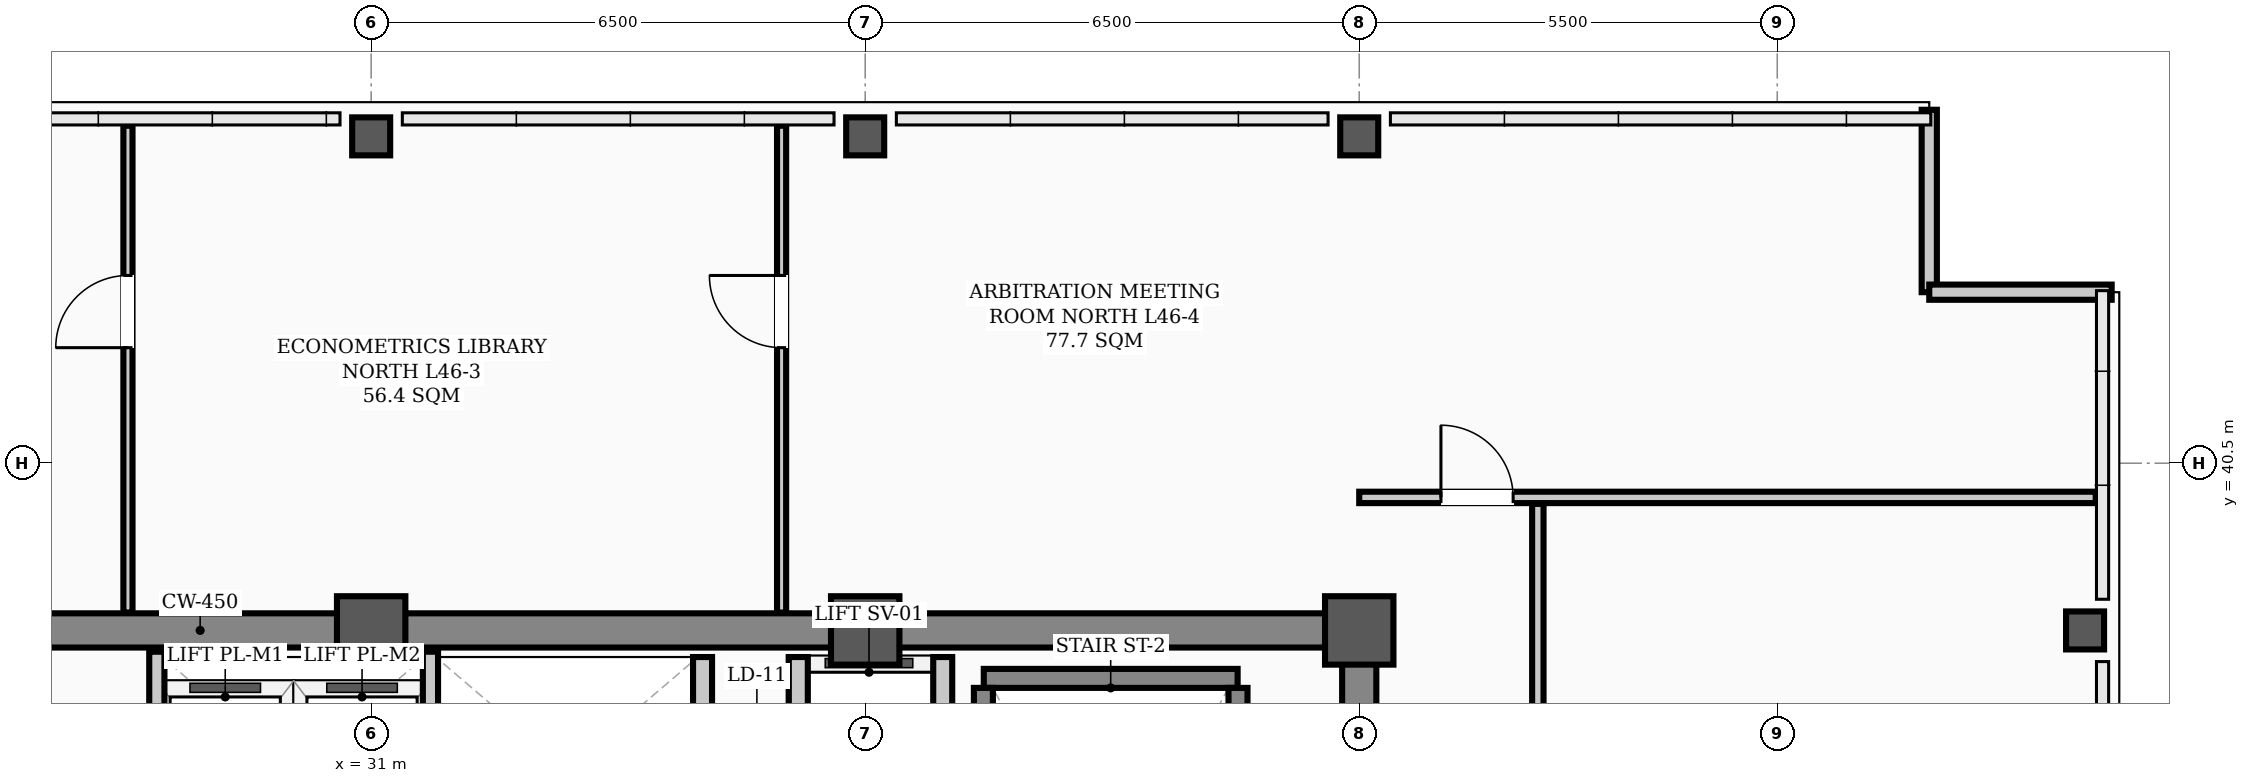
"""IFC4 building model, lengths in metres.
Left out: names, types, materials, properties, quantities, classifications, styles, units other than length and angle.
Written with IfcOpenShell. Run it as: python <this file> out.ifc"""

import sys

from ifc_helpers import new_model, si_unit, direction, frame, frame_2d, origin, origin_2d, place, context, subcontext, project, spatial, rectangle, hollow_rectangle, extrude, element, fill, save


model = new_model("IFC4")
c1 = context("Model", 3, precision=1e-05, world=origin(), true_north=direction((0.0, 1.0)))
c2 = subcontext(c1, "Body", "Model", "MODEL_VIEW")
j1 = project(units=[si_unit("LENGTHUNIT", "METRE"), si_unit("PLANEANGLEUNIT", "RADIAN")], contexts=[c1])
p1 = place(None, origin())
s1 = spatial("IfcSite", under=j1, at=p1, CompositionType="ELEMENT")
p2 = place(p1, origin())
s2 = spatial("IfcBuilding", under=s1, at=p2, CompositionType="ELEMENT")
p3 = place(p2, frame((0.0, 0.0, 185.1)))
s3 = spatial("IfcBuildingStorey", under=s2, at=p3, CompositionType="ELEMENT", Elevation=185.1)
for number, where, z_axis, x_axis in (
    (1, (31.0, 38.3, 0.0), (0.0, 0.0, 1.0), (1.0, 0.0, 0.0)),
    (2, (37.5, 38.3, 0.0), (0.0, 0.0, 1.0), (1.0, 0.0, 0.0)),
    (3, (44.0, 38.3, 0.0), (0.0, 0.0, 1.0), (1.0, 0.0, 0.0)),
):
    element("IfcColumn", number, at=place(p3, frame(where, z_axis=z_axis, x_axis=x_axis)), inside=s3, PredefinedType="COLUMN", context=c2, shape_type="SweptSolid", body=[
        extrude(hollow_rectangle(XDim=0.9, YDim=0.9, WallThickness=0.035, InnerFilletRadius=0.017, OuterFilletRadius=0.052, at=origin_2d()), origin(), (0.0, 0.0, 1.0), 3.9),
    ])
for number, where, z_axis, x_axis in (
    (4, (31.0, 44.8, 0.0), (0.0, 0.0, 1.0), (1.0, 0.0, 0.0)),
    (5, (37.5, 44.8, 0.0), (0.0, 0.0, 1.0), (1.0, 0.0, 0.0)),
    (6, (44.0, 44.8, 0.0), (0.0, 0.0, 1.0), (1.0, 0.0, 0.0)),
    (7, (53.55, 38.3, 0.0), (0.0, 0.0, 1.0), (1.0, 0.0, 0.0)),
):
    element("IfcColumn", number, at=place(p3, frame(where, z_axis=z_axis, x_axis=x_axis)), inside=s3, PredefinedType="COLUMN", context=c2, shape_type="SweptSolid", body=[
        extrude(hollow_rectangle(XDim=0.5, YDim=0.5, WallThickness=0.024, InnerFilletRadius=0.012, OuterFilletRadius=0.036, at=origin_2d()), origin(), (0.0, 0.0, 1.0), 3.9),
    ])
for number, where, z_axis, x_axis in (
    (8, (51.5, 45.15, 0.0), (0.0, 0.0, 1.0), (0.0, -1.0, 0.0)),
    (9, (51.5, 42.75, 0.0), (0.0, 0.0, 1.0), (1.0, 0.0, 0.0)),
):
    element("IfcWall", number, at=place(p3, frame(where, z_axis=z_axis, x_axis=x_axis)), inside=s3, PredefinedType="PARAPET", context=c2, shape_type="SweptSolid", body=[
        extrude(rectangle(XDim=2.4, YDim=0.2, at=frame_2d((1.2, 0.0))), origin(), (0.0, 0.0, 1.0), 1.2),
    ])
p4 = place(p3, frame((13.5, 38.3, 0.0), z_axis=(0.0, 0.0, 1.0), x_axis=(1.0, 0.0, 0.0)))
e10 = element("IfcWall", 10, at=p4, inside=s3, PredefinedType="SHEAR", context=c2, shape_type="SweptSolid", body=[
    extrude(rectangle(XDim=30.5, YDim=0.45, at=frame_2d((15.25, 0.0))), origin(), (0.0, 0.0, 1.0), 3.72),
])
p5 = place(p3, frame((44.0, 29.35, 0.0), z_axis=(0.0, 0.0, 1.0), x_axis=(0.0, 1.0, 0.0)))
e11 = element("IfcWall", 11, at=p5, inside=s3, PredefinedType="SHEAR", context=c2, shape_type="SweptSolid", body=[
    extrude(rectangle(XDim=8.6, YDim=0.45, at=frame_2d((4.3, 0.0))), origin(), (0.0, 0.0, 1.0), 3.72),
])
p6 = place(p3, frame((39.06, 37.669, 0.0), z_axis=(0.0, 0.0, 1.0), x_axis=(1.0, 0.0, 0.0)))
e12 = element("IfcWall", 12, at=p6, inside=s3, PredefinedType="STANDARD", context=c2, shape_type="SweptSolid", body=[
    extrude(rectangle(XDim=3.34, YDim=0.25, at=frame_2d((1.67, 0.0))), origin(), (0.0, 0.0, 1.0), 3.72),
])
for number, where, z_axis, x_axis in (
    (13, (39.055, 30.36, 0.0), (0.0, 0.0, 1.0), (0.0, 1.0, 0.0)),
    (14, (42.405, 30.36, 0.0), (0.0, 0.0, 1.0), (0.0, 1.0, 0.0)),
):
    element("IfcWall", number, at=place(p3, frame(where, z_axis=z_axis, x_axis=x_axis)), inside=s3, PredefinedType="STANDARD", context=c2, shape_type="SweptSolid", body=[
        extrude(rectangle(XDim=7.184, YDim=0.25, at=frame_2d((3.592, 0.0))), origin(), (0.0, 0.0, 1.0), 3.72),
    ])
p7 = place(p3, frame((36.62, 31.95, 0.0), z_axis=(0.0, 0.0, 1.0), x_axis=(0.0, 1.0, 0.0)))
e15 = element("IfcWall", 15, at=p7, inside=s3, PredefinedType="STANDARD", context=c2, shape_type="SweptSolid", body=[
    extrude(rectangle(XDim=6.0, YDim=0.25, at=frame_2d((3.0, 0.0))), origin(), (0.0, 0.0, 1.0), 3.35),
])
p8 = place(p7, frame((0.9, 0.0, 0.0)))
e16 = element("IfcOpeningElement", 16, at=p8, cuts=e15, PredefinedType="OPENING", context=c2, shape_type="SweptSolid", body=[
    extrude(rectangle(XDim=1.1, YDim=2.08, at=frame_2d((0.55, 1.04))), frame((0.0, 0.135, 0.0), z_axis=(0.0, -1.0, 0.0), x_axis=(1.0, 0.0, 0.0)), (0.0, 0.0, 1.0), 0.27),
])
p9 = place(p7, frame((4.0, 0.0, 0.0)))
e17 = element("IfcOpeningElement", 17, at=p9, cuts=e15, PredefinedType="OPENING", context=c2, shape_type="SweptSolid", body=[
    extrude(rectangle(XDim=1.1, YDim=2.08, at=frame_2d((0.55, 1.04))), frame((0.0, 0.135, 0.0), z_axis=(0.0, -1.0, 0.0), x_axis=(1.0, 0.0, 0.0)), (0.0, 0.0, 1.0), 0.27),
])
p10 = place(p3, frame((38.52, 31.95, 0.0), z_axis=(0.0, 0.0, 1.0), x_axis=(0.0, 1.0, 0.0)))
e18 = element("IfcWall", 18, at=p10, inside=s3, PredefinedType="STANDARD", context=c2, shape_type="SweptSolid", body=[
    extrude(rectangle(XDim=6.0, YDim=0.25, at=frame_2d((3.0, 0.0))), origin(), (0.0, 0.0, 1.0), 3.35),
])
p11 = place(p3, frame((35.36, 34.9, 0.0), z_axis=(0.0, 0.0, 1.0), x_axis=(0.0, 1.0, 0.0)))
e19 = element("IfcWall", 19, at=p11, inside=s3, PredefinedType="STANDARD", context=c2, shape_type="SweptSolid", body=[
    extrude(rectangle(XDim=3.05, YDim=0.25, at=frame_2d((1.525, 0.0))), origin(), (0.0, 0.0, 1.0), 3.35),
])
p12 = place(p3, frame((44.0, 40.05, 0.0), z_axis=(0.0, 0.0, 1.0), x_axis=(1.0, 0.0, 0.0)))
e20 = element("IfcWall", 20, at=p12, inside=s3, PredefinedType="PARTITIONING", context=c2, shape_type="SweptSolid", body=[
    extrude(rectangle(XDim=9.69, YDim=0.15, at=frame_2d((4.845, 0.0))), origin(), (0.0, 0.0, 1.0), 3.2),
])
p13 = place(p12, frame((1.075, 0.0, 0.0)))
e21 = element("IfcOpeningElement", 21, at=p13, cuts=e20, PredefinedType="OPENING", context=c2, shape_type="SweptSolid", body=[
    extrude(rectangle(XDim=0.95, YDim=2.08, at=frame_2d((0.475, 1.04))), frame((0.0, 0.085, 0.0), z_axis=(0.0, -1.0, 0.0), x_axis=(1.0, 0.0, 0.0)), (0.0, 0.0, 1.0), 0.17),
])
p14 = place(p3, frame((46.35, 26.385, 0.0), z_axis=(0.0, 0.0, 1.0), x_axis=(0.0, 1.0, 0.0)))
e22 = element("IfcWall", 22, at=p14, inside=s3, PredefinedType="PARTITIONING", context=c2, shape_type="SweptSolid", body=[
    extrude(rectangle(XDim=13.58, YDim=0.15, at=frame_2d((6.79, 0.0))), origin(), (0.0, 0.0, 1.0), 3.1),
])
p15 = place(p14, frame((0.64, 0.0, 0.0)))
e23 = element("IfcOpeningElement", 23, at=p15, cuts=e22, PredefinedType="OPENING", context=c2, shape_type="SweptSolid", body=[
    extrude(rectangle(XDim=0.95, YDim=2.08, at=frame_2d((0.475, 1.04))), frame((0.0, 0.085, 0.0), z_axis=(0.0, -1.0, 0.0), x_axis=(1.0, 0.0, 0.0)), (0.0, 0.0, 1.0), 0.17),
])
p16 = place(p14, frame((9.665, 0.0, 0.0)))
e24 = element("IfcOpeningElement", 24, at=p16, cuts=e22, PredefinedType="OPENING", context=c2, shape_type="SweptSolid", body=[
    extrude(rectangle(XDim=0.95, YDim=2.08, at=frame_2d((0.475, 1.04))), frame((0.0, 0.085, 0.0), z_axis=(0.0, -1.0, 0.0), x_axis=(1.0, 0.0, 0.0)), (0.0, 0.0, 1.0), 0.17),
])
p17 = place(p3, frame((27.8, 38.535, 0.0), z_axis=(0.0, 0.0, 1.0), x_axis=(0.0, 1.0, 0.0)))
e25 = element("IfcWall", 25, at=p17, inside=s3, PredefinedType="PARTITIONING", context=c2, shape_type="SweptSolid", body=[
    extrude(rectangle(XDim=6.405, YDim=0.12, at=frame_2d((3.203, 0.0))), origin(), (0.0, 0.0, 1.0), 3.212),
])
p18 = place(p17, frame((3.485, 0.0, 0.0)))
e26 = element("IfcOpeningElement", 26, at=p18, cuts=e25, PredefinedType="OPENING", context=c2, shape_type="SweptSolid", body=[
    extrude(rectangle(XDim=0.95, YDim=2.08, at=frame_2d((0.475, 1.04))), frame((0.0, 0.07, 0.0), z_axis=(0.0, -1.0, 0.0), x_axis=(1.0, 0.0, 0.0)), (0.0, 0.0, 1.0), 0.14),
])
p19 = place(p3, frame((36.4, 38.535, 0.0), z_axis=(0.0, 0.0, 1.0), x_axis=(0.0, 1.0, 0.0)))
e27 = element("IfcWall", 27, at=p19, inside=s3, PredefinedType="PARTITIONING", context=c2, shape_type="SweptSolid", body=[
    extrude(rectangle(XDim=6.405, YDim=0.12, at=frame_2d((3.203, 0.0))), origin(), (0.0, 0.0, 1.0), 3.212),
])
p20 = place(p19, frame((3.485, 0.0, 0.0)))
e28 = element("IfcOpeningElement", 28, at=p20, cuts=e27, PredefinedType="OPENING", context=c2, shape_type="SweptSolid", body=[
    extrude(rectangle(XDim=0.95, YDim=2.08, at=frame_2d((0.475, 1.04))), frame((0.0, 0.07, 0.0), z_axis=(0.0, -1.0, 0.0), x_axis=(1.0, 0.0, 0.0)), (0.0, 0.0, 1.0), 0.14),
])
for number, where, z_axis, x_axis in (
    (29, (28.18, 34.9, 0.0), (0.0, 0.0, 1.0), (0.0, 1.0, 0.0)),
    (30, (31.78, 34.9, 0.0), (0.0, 0.0, 1.0), (0.0, 1.0, 0.0)),
):
    element("IfcWall", number, at=place(p3, frame(where, z_axis=z_axis, x_axis=x_axis)), inside=s3, PredefinedType="STANDARD", context=c2, shape_type="SweptSolid", body=[
        extrude(rectangle(XDim=3.12, YDim=0.2, at=frame_2d((1.56, 0.0))), origin(), (0.0, 0.0, 1.0), 3.35),
    ])
p21 = place(p13, origin())
e31 = element("IfcDoor", 31, at=p21, inside=s3, OperationType="SINGLE_SWING_LEFT", PredefinedType="DOOR", context=c2, shape_type="SweptSolid", body=[
    extrude(rectangle(XDim=0.95, YDim=2.08, at=frame_2d((0.475, 1.04))), frame((0.0, 0.025, 0.0), z_axis=(0.0, -1.0, 0.0), x_axis=(1.0, 0.0, 0.0)), (0.0, 0.0, 1.0), 0.05),
])
fill(e21, e31)
p22 = place(p18, origin())
e32 = element("IfcDoor", 32, at=p22, inside=s3, OperationType="SINGLE_SWING_LEFT", PredefinedType="DOOR", context=c2, shape_type="SweptSolid", body=[
    extrude(rectangle(XDim=0.95, YDim=2.08, at=frame_2d((0.475, 1.04))), frame((0.0, 0.025, 0.0), z_axis=(0.0, -1.0, 0.0), x_axis=(1.0, 0.0, 0.0)), (0.0, 0.0, 1.0), 0.05),
])
fill(e26, e32)
p23 = place(p20, origin())
e33 = element("IfcDoor", 33, at=p23, inside=s3, OperationType="SINGLE_SWING_RIGHT", PredefinedType="DOOR", context=c2, shape_type="SweptSolid", body=[
    extrude(rectangle(XDim=0.95, YDim=2.08, at=frame_2d((0.475, 1.04))), frame((0.0, 0.025, 0.0), z_axis=(0.0, -1.0, 0.0), x_axis=(1.0, 0.0, 0.0)), (0.0, 0.0, 1.0), 0.05),
])
fill(e28, e33)
save(model, sys.argv[1])
